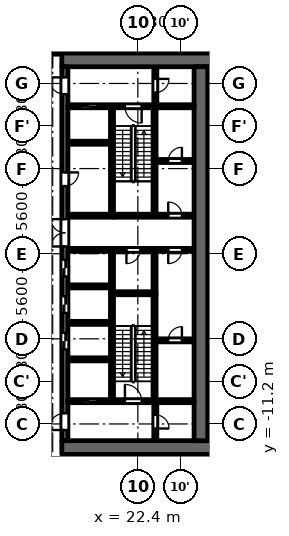
"""IFC4 building model, lengths in metres.
Left out: names, types, materials, properties, quantities, classifications, styles, units other than length and angle.
Written with IfcOpenShell. Run it as: python <this file> out.ifc"""

import sys

from ifc_helpers import new_model, si_unit, direction, frame, frame_2d, origin, place, context, subcontext, project, spatial, rectangle, extrude, element, fill, save


model = new_model("IFC4")
c1 = context("Model", 3, precision=1e-05, world=origin(), true_north=direction((0.0, 1.0)))
c2 = subcontext(c1, "Body", "Model", "MODEL_VIEW")
j1 = project(units=[si_unit("LENGTHUNIT", "METRE"), si_unit("PLANEANGLEUNIT", "RADIAN")], contexts=[c1])
p1 = place(None, origin())
s1 = spatial("IfcSite", under=j1, at=p1, CompositionType="ELEMENT")
p2 = place(p1, origin())
s2 = spatial("IfcBuilding", under=s1, at=p2, CompositionType="ELEMENT")
p3 = place(p2, frame((0.0, 0.0, 6.5)))
s3 = spatial("IfcBuildingStorey", under=s2, at=p3, CompositionType="ELEMENT", Elevation=6.5)
p4 = place(p3, frame((23.5, -2.5, 0.0), z_axis=(0.0, 0.0, 1.0), x_axis=(0.0, 1.0, 0.0)))
e1 = element("IfcWall", 1, at=p4, inside=s3, PredefinedType="PARTITIONING", context=c2, shape_type="SweptSolid", body=[
    extrude(rectangle(XDim=2.65, YDim=0.2, at=frame_2d((1.325, 0.0))), origin(), (0.0, 0.0, 1.0), 4.45),
])
p5 = place(p3, frame((20.7, 2.6, 0.0), z_axis=(0.0, 0.0, 1.0), x_axis=(0.0, 1.0, 0.0)))
e2 = element("IfcWall", 2, at=p5, inside=s3, PredefinedType="SHEAR", context=c2, shape_type="SweptSolid", body=[
    extrude(rectangle(XDim=7.0, YDim=0.2, at=frame_2d((3.5, 0.0))), origin(), (0.0, 0.0, 1.0), 4.45),
])
p6 = place(p3, frame((20.7, -9.6, 0.0), z_axis=(0.0, 0.0, 1.0), x_axis=(0.0, 1.0, 0.0)))
e3 = element("IfcWall", 3, at=p6, inside=s3, PredefinedType="SHEAR", context=c2, shape_type="SweptSolid", body=[
    extrude(rectangle(XDim=9.75, YDim=0.2, at=frame_2d((4.875, 0.0))), origin(), (0.0, 0.0, 1.0), 4.45),
])
p7 = place(p3, frame((20.8, 2.5, 0.0), z_axis=(0.0, 0.0, 1.0), x_axis=(1.0, 0.0, 0.0)))
e4 = element("IfcWall", 4, at=p7, inside=s3, PredefinedType="SHEAR", context=c2, shape_type="SweptSolid", body=[
    extrude(rectangle(XDim=5.3, YDim=0.2, at=frame_2d((2.65, 0.0))), origin(), (0.0, 0.0, 1.0), 4.45),
])
p8 = place(p7, frame((3.6, 0.0, 0.0)))
e5 = element("IfcOpeningElement", 5, at=p8, cuts=e4, PredefinedType="OPENING", context=c2, shape_type="SweptSolid", body=[
    extrude(rectangle(XDim=0.9, YDim=2.1, at=frame_2d((0.45, 1.05))), frame((0.0, 0.11, 0.0), z_axis=(0.0, -1.0, 0.0), x_axis=(1.0, 0.0, 0.0)), (0.0, 0.0, 1.0), 0.22),
])
p9 = place(p3, frame((20.8, 0.25, 0.0), z_axis=(0.0, 0.0, 1.0), x_axis=(1.0, 0.0, 0.0)))
e6 = element("IfcWall", 6, at=p9, inside=s3, PredefinedType="PARTITIONING", context=c2, shape_type="SweptSolid", body=[
    extrude(rectangle(XDim=5.3, YDim=0.2, at=frame_2d((2.65, 0.0))), origin(), (0.0, 0.0, 1.0), 4.45),
])
p10 = place(p9, frame((0.85, 0.0, 0.0)))
e7 = element("IfcOpeningElement", 7, at=p10, cuts=e6, PredefinedType="OPENING", context=c2, shape_type="SweptSolid", body=[
    extrude(rectangle(XDim=0.9, YDim=2.1, at=frame_2d((0.45, 1.05))), frame((0.0, 0.11, 0.0), z_axis=(0.0, -1.0, 0.0), x_axis=(1.0, 0.0, 0.0)), (0.0, 0.0, 1.0), 0.22),
])
p11 = place(p9, frame((3.6, 0.0, 0.0)))
e8 = element("IfcOpeningElement", 8, at=p11, cuts=e6, PredefinedType="OPENING", context=c2, shape_type="SweptSolid", body=[
    extrude(rectangle(XDim=0.9, YDim=2.1, at=frame_2d((0.45, 1.05))), frame((0.0, 0.11, 0.0), z_axis=(0.0, -1.0, 0.0), x_axis=(1.0, 0.0, 0.0)), (0.0, 0.0, 1.0), 0.22),
])
for number, where, z_axis, x_axis in (
    (9, (17.4, 12.75, 0.0), (0.0, 0.0, 1.0), (1.0, 0.0, 0.0)),
    (10, (17.4, -12.75, 0.0), (0.0, 0.0, 1.0), (1.0, 0.0, 0.0)),
):
    element("IfcWall", number, at=place(p3, frame(where, z_axis=z_axis, x_axis=x_axis)), inside=s3, PredefinedType="SHEAR", context=c2, shape_type="SweptSolid", body=[
        extrude(rectangle(XDim=10.4, YDim=0.9, at=frame_2d((5.2, 0.0))), origin(), (0.0, 0.0, 1.0), 4.45),
    ])
p12 = place(p3, frame((17.6, -12.3, 0.0), z_axis=(0.0, 0.0, 1.0), x_axis=(0.0, 1.0, 0.0)))
e11 = element("IfcWall", 11, at=p12, inside=s3, PredefinedType="SHEAR", context=c2, shape_type="SweptSolid", body=[
    extrude(rectangle(XDim=24.6, YDim=0.4, at=frame_2d((12.3, 0.0))), origin(), (0.0, 0.0, 1.0), 4.45),
])
p13 = place(p12, frame((6.0, 0.0, 0.0)))
e12 = element("IfcOpeningElement", 12, at=p13, cuts=e11, PredefinedType="OPENING", context=c2, shape_type="SweptSolid", body=[
    extrude(rectangle(XDim=1.1, YDim=2.1, at=frame_2d((0.55, 1.05))), frame((0.0, 0.21, 0.0), z_axis=(0.0, -1.0, 0.0), x_axis=(1.0, 0.0, 0.0)), (0.0, 0.0, 1.0), 0.42),
])
p14 = place(p12, frame((8.4, 0.0, 0.0)))
e13 = element("IfcOpeningElement", 13, at=p14, cuts=e11, PredefinedType="OPENING", context=c2, shape_type="SweptSolid", body=[
    extrude(rectangle(XDim=1.1, YDim=2.1, at=frame_2d((0.55, 1.05))), frame((0.0, 0.21, 0.0), z_axis=(0.0, -1.0, 0.0), x_axis=(1.0, 0.0, 0.0)), (0.0, 0.0, 1.0), 0.42),
])
p15 = place(p12, frame((10.8, 0.0, 0.0)))
e14 = element("IfcOpeningElement", 14, at=p15, cuts=e11, PredefinedType="OPENING", context=c2, shape_type="SweptSolid", body=[
    extrude(rectangle(XDim=1.1, YDim=2.1, at=frame_2d((0.55, 1.05))), frame((0.0, 0.21, 0.0), z_axis=(0.0, -1.0, 0.0), x_axis=(1.0, 0.0, 0.0)), (0.0, 0.0, 1.0), 0.42),
])
p16 = place(p12, frame((16.75, 0.0, 0.0)))
e15 = element("IfcOpeningElement", 15, at=p16, cuts=e11, PredefinedType="OPENING", context=c2, shape_type="SweptSolid", body=[
    extrude(rectangle(XDim=0.9, YDim=2.1, at=frame_2d((0.45, 1.05))), frame((0.0, 0.21, 0.0), z_axis=(0.0, -1.0, 0.0), x_axis=(1.0, 0.0, 0.0)), (0.0, 0.0, 1.0), 0.42),
])
p17 = place(p12, frame((22.8, 0.0, 0.0)))
e16 = element("IfcOpeningElement", 16, at=p17, cuts=e11, PredefinedType="OPENING", context=c2, shape_type="SweptSolid", body=[
    extrude(rectangle(XDim=1.1, YDim=2.1, at=frame_2d((0.55, 1.05))), frame((0.0, 0.21, 0.0), z_axis=(0.0, -1.0, 0.0), x_axis=(1.0, 0.0, 0.0)), (0.0, 0.0, 1.0), 0.42),
])
p18 = place(p12, frame((0.7, 0.0, 0.0)))
e17 = element("IfcOpeningElement", 17, at=p18, cuts=e11, PredefinedType="OPENING", context=c2, shape_type="SweptSolid", body=[
    extrude(rectangle(XDim=1.1, YDim=2.1, at=frame_2d((0.55, 1.05))), frame((0.0, 0.21, 0.0), z_axis=(0.0, -1.0, 0.0), x_axis=(1.0, 0.0, 0.0)), (0.0, 0.0, 1.0), 0.42),
])
p19 = place(p12, frame((12.775, 0.0, 0.0)))
e18 = element("IfcOpeningElement", 18, at=p19, cuts=e11, PredefinedType="OPENING", context=c2, shape_type="SweptSolid", body=[
    extrude(rectangle(XDim=1.8, YDim=2.1, at=frame_2d((0.9, 1.05))), frame((0.0, 0.21, 0.0), z_axis=(0.0, -1.0, 0.0), x_axis=(1.0, 0.0, 0.0)), (0.0, 0.0, 1.0), 0.42),
])
p20 = place(p3, frame((26.55, -12.3, 0.0), z_axis=(0.0, 0.0, 1.0), x_axis=(0.0, 1.0, 0.0)))
e19 = element("IfcWall", 19, at=p20, inside=s3, PredefinedType="SHEAR", context=c2, shape_type="SweptSolid", body=[
    extrude(rectangle(XDim=24.6, YDim=0.9, at=frame_2d((12.3, 0.0))), origin(), (0.0, 0.0, 1.0), 4.45),
])
p21 = place(p3, frame((23.55, 9.8, 0.0), z_axis=(0.0, 0.0, 1.0), x_axis=(0.0, 1.0, 0.0)))
e20 = element("IfcWall", 20, at=p21, inside=s3, PredefinedType="PARTITIONING", context=c2, shape_type="SweptSolid", body=[
    extrude(rectangle(XDim=2.5, YDim=0.2, at=frame_2d((1.25, 0.0))), origin(), (0.0, 0.0, 1.0), 4.45),
])
p22 = place(p21, frame((0.8, 0.0, 0.0)))
e21 = element("IfcOpeningElement", 21, at=p22, cuts=e20, PredefinedType="OPENING", context=c2, shape_type="SweptSolid", body=[
    extrude(rectangle(XDim=0.9, YDim=2.1, at=frame_2d((0.45, 1.05))), frame((0.0, 0.11, 0.0), z_axis=(0.0, -1.0, 0.0), x_axis=(1.0, 0.0, 0.0)), (0.0, 0.0, 1.0), 0.22),
])
p23 = place(p3, frame((23.55, -12.3, 0.0), z_axis=(0.0, 0.0, 1.0), x_axis=(0.0, 1.0, 0.0)))
e22 = element("IfcWall", 22, at=p23, inside=s3, PredefinedType="PARTITIONING", context=c2, shape_type="SweptSolid", body=[
    extrude(rectangle(XDim=2.5, YDim=0.2, at=frame_2d((1.25, 0.0))), origin(), (0.0, 0.0, 1.0), 4.45),
])
p24 = place(p23, frame((0.8, 0.0, 0.0)))
e23 = element("IfcOpeningElement", 23, at=p24, cuts=e22, PredefinedType="OPENING", context=c2, shape_type="SweptSolid", body=[
    extrude(rectangle(XDim=0.9, YDim=2.1, at=frame_2d((0.45, 1.05))), frame((0.0, 0.11, 0.0), z_axis=(0.0, -1.0, 0.0), x_axis=(1.0, 0.0, 0.0)), (0.0, 0.0, 1.0), 0.22),
])
p25 = place(p3, frame((23.6, -5.7, 0.0), z_axis=(0.0, 0.0, 1.0), x_axis=(1.0, 0.0, 0.0)))
e24 = element("IfcWall", 24, at=p25, inside=s3, PredefinedType="PARTITIONING", context=c2, shape_type="SweptSolid", body=[
    extrude(rectangle(XDim=2.5, YDim=0.2, at=frame_2d((1.25, 0.0))), origin(), (0.0, 0.0, 1.0), 4.45),
])
p26 = place(p25, frame((0.8, 0.0, 0.0)))
e25 = element("IfcOpeningElement", 25, at=p26, cuts=e24, PredefinedType="OPENING", context=c2, shape_type="SweptSolid", body=[
    extrude(rectangle(XDim=0.9, YDim=2.1, at=frame_2d((0.45, 1.05))), frame((0.0, 0.11, 0.0), z_axis=(0.0, -1.0, 0.0), x_axis=(1.0, 0.0, 0.0)), (0.0, 0.0, 1.0), 0.22),
])
p27 = place(p3, frame((23.6, 6.1, 0.0), z_axis=(0.0, 0.0, 1.0), x_axis=(1.0, 0.0, 0.0)))
e26 = element("IfcWall", 26, at=p27, inside=s3, PredefinedType="PARTITIONING", context=c2, shape_type="SweptSolid", body=[
    extrude(rectangle(XDim=2.5, YDim=0.2, at=frame_2d((1.25, 0.0))), origin(), (0.0, 0.0, 1.0), 4.45),
])
p28 = place(p27, frame((0.8, 0.0, 0.0)))
e27 = element("IfcOpeningElement", 27, at=p28, cuts=e26, PredefinedType="OPENING", context=c2, shape_type="SweptSolid", body=[
    extrude(rectangle(XDim=0.9, YDim=2.1, at=frame_2d((0.45, 1.05))), frame((0.0, 0.11, 0.0), z_axis=(0.0, -1.0, 0.0), x_axis=(1.0, 0.0, 0.0)), (0.0, 0.0, 1.0), 0.22),
])
p29 = place(p3, frame((17.8, -9.7, 0.0), z_axis=(0.0, 0.0, 1.0), x_axis=(1.0, 0.0, 0.0)))
e28 = element("IfcWall", 28, at=p29, inside=s3, PredefinedType="SHEAR", context=c2, shape_type="SweptSolid", body=[
    extrude(rectangle(XDim=8.3, YDim=0.2, at=frame_2d((4.15, 0.0))), origin(), (0.0, 0.0, 1.0), 4.45),
])
p30 = place(p29, frame((0.85, 0.0, 0.0)))
e29 = element("IfcOpeningElement", 29, at=p30, cuts=e28, PredefinedType="OPENING", context=c2, shape_type="SweptSolid", body=[
    extrude(rectangle(XDim=1.1, YDim=2.1, at=frame_2d((0.55, 1.05))), frame((0.0, 0.11, 0.0), z_axis=(0.0, -1.0, 0.0), x_axis=(1.0, 0.0, 0.0)), (0.0, 0.0, 1.0), 0.22),
])
p31 = place(p29, frame((3.75, 0.0, 0.0)))
e30 = element("IfcOpeningElement", 30, at=p31, cuts=e28, PredefinedType="OPENING", context=c2, shape_type="SweptSolid", body=[
    extrude(rectangle(XDim=1.1, YDim=2.1, at=frame_2d((0.55, 1.05))), frame((0.0, 0.11, 0.0), z_axis=(0.0, -1.0, 0.0), x_axis=(1.0, 0.0, 0.0)), (0.0, 0.0, 1.0), 0.22),
])
for number, where, z_axis, x_axis in (
    (31, (17.8, -6.95, 0.0), (0.0, 0.0, 1.0), (1.0, 0.0, 0.0)),
    (32, (17.8, -4.55, 0.0), (0.0, 0.0, 1.0), (1.0, 0.0, 0.0)),
    (33, (17.8, -2.15, 0.0), (0.0, 0.0, 1.0), (1.0, 0.0, 0.0)),
):
    element("IfcWall", number, at=place(p3, frame(where, z_axis=z_axis, x_axis=x_axis)), inside=s3, PredefinedType="PARTITIONING", context=c2, shape_type="SweptSolid", body=[
        extrude(rectangle(XDim=2.8, YDim=0.2, at=frame_2d((1.4, 0.0))), origin(), (0.0, 0.0, 1.0), 4.45),
    ])
for number, where, z_axis, x_axis in (
    (34, (17.8, 0.25, 0.0), (0.0, 0.0, 1.0), (1.0, 0.0, 0.0)),
    (35, (17.8, 2.5, 0.0), (0.0, 0.0, 1.0), (1.0, 0.0, 0.0)),
):
    element("IfcWall", number, at=place(p3, frame(where, z_axis=z_axis, x_axis=x_axis)), inside=s3, PredefinedType="PARTITIONING", context=c2, shape_type="SweptSolid", body=[
        extrude(rectangle(XDim=3.0, YDim=0.2, at=frame_2d((1.5, 0.0))), origin(), (0.0, 0.0, 1.0), 4.45),
    ])
p32 = place(p3, frame((17.8, 7.3, 0.0), z_axis=(0.0, 0.0, 1.0), x_axis=(1.0, 0.0, 0.0)))
e36 = element("IfcWall", 36, at=p32, inside=s3, PredefinedType="PARTITIONING", context=c2, shape_type="SweptSolid", body=[
    extrude(rectangle(XDim=2.8, YDim=0.2, at=frame_2d((1.4, 0.0))), origin(), (0.0, 0.0, 1.0), 4.45),
])
p33 = place(p3, frame((17.8, 9.7, 0.0), z_axis=(0.0, 0.0, 1.0), x_axis=(1.0, 0.0, 0.0)))
e37 = element("IfcWall", 37, at=p33, inside=s3, PredefinedType="SHEAR", context=c2, shape_type="SweptSolid", body=[
    extrude(rectangle(XDim=8.3, YDim=0.2, at=frame_2d((4.15, 0.0))), origin(), (0.0, 0.0, 1.0), 4.45),
])
p34 = place(p33, frame((0.85, 0.0, 0.0)))
e38 = element("IfcOpeningElement", 38, at=p34, cuts=e37, PredefinedType="OPENING", context=c2, shape_type="SweptSolid", body=[
    extrude(rectangle(XDim=1.1, YDim=2.1, at=frame_2d((0.55, 1.05))), frame((0.0, 0.11, 0.0), z_axis=(0.0, -1.0, 0.0), x_axis=(1.0, 0.0, 0.0)), (0.0, 0.0, 1.0), 0.22),
])
p35 = place(p33, frame((3.75, 0.0, 0.0)))
e39 = element("IfcOpeningElement", 39, at=p35, cuts=e37, PredefinedType="OPENING", context=c2, shape_type="SweptSolid", body=[
    extrude(rectangle(XDim=1.1, YDim=2.1, at=frame_2d((0.55, 1.05))), frame((0.0, 0.11, 0.0), z_axis=(0.0, -1.0, 0.0), x_axis=(1.0, 0.0, 0.0)), (0.0, 0.0, 1.0), 0.22),
])
p36 = place(p3, frame((23.5, 2.6, 0.0), z_axis=(0.0, 0.0, 1.0), x_axis=(0.0, 1.0, 0.0)))
e40 = element("IfcWall", 40, at=p36, inside=s3, PredefinedType="SHEAR", context=c2, shape_type="SweptSolid", body=[
    extrude(rectangle(XDim=7.0, YDim=0.2, at=frame_2d((3.5, 0.0))), origin(), (0.0, 0.0, 1.0), 4.45),
])
p37 = place(p3, frame((23.5, -9.6, 0.0), z_axis=(0.0, 0.0, 1.0), x_axis=(0.0, 1.0, 0.0)))
e41 = element("IfcWall", 41, at=p37, inside=s3, PredefinedType="SHEAR", context=c2, shape_type="SweptSolid", body=[
    extrude(rectangle(XDim=6.9, YDim=0.2, at=frame_2d((3.45, 0.0))), origin(), (0.0, 0.0, 1.0), 4.45),
])
p38 = place(p3, frame((20.8, -2.6, 0.0), z_axis=(0.0, 0.0, 1.0), x_axis=(1.0, 0.0, 0.0)))
e42 = element("IfcWall", 42, at=p38, inside=s3, PredefinedType="SHEAR", context=c2, shape_type="SweptSolid", body=[
    extrude(rectangle(XDim=2.8, YDim=0.2, at=frame_2d((1.4, 0.0))), origin(), (0.0, 0.0, 1.0), 4.45),
])
p39 = place(p3, frame((-17.4, 13.2, 0.0), z_axis=(0.0, 0.0, 1.0), x_axis=(1.0, 0.0, 0.0)))
e43 = element("IfcWall", 43, at=p39, inside=s3, PredefinedType="PARTITIONING", context=c2, shape_type="SweptSolid", body=[
    extrude(rectangle(XDim=34.8, YDim=0.15, at=frame_2d((17.4, 0.0))), origin(), (0.0, 0.0, 1.0), 4.45),
])
p40 = place(p39, frame((3.05, 0.0, 0.0)))
e44 = element("IfcOpeningElement", 44, at=p40, cuts=e43, PredefinedType="OPENING", context=c2, shape_type="SweptSolid", body=[
    extrude(rectangle(XDim=1.8, YDim=2.1, at=frame_2d((0.9, 1.05))), frame((0.0, 0.085, 0.0), z_axis=(0.0, -1.0, 0.0), x_axis=(1.0, 0.0, 0.0)), (0.0, 0.0, 1.0), 0.17),
])
p41 = place(p39, frame((0.75, 0.0, 0.0)))
e45 = element("IfcOpeningElement", 45, at=p41, cuts=e43, PredefinedType="OPENING", context=c2, shape_type="SweptSolid", body=[
    extrude(rectangle(XDim=1.0, YDim=2.1, at=frame_2d((0.5, 1.05))), frame((0.0, 0.085, 0.0), z_axis=(0.0, -1.0, 0.0), x_axis=(1.0, 0.0, 0.0)), (0.0, 0.0, 1.0), 0.17),
])
p42 = place(p39, frame((33.15, 0.0, 0.0)))
e46 = element("IfcOpeningElement", 46, at=p42, cuts=e43, PredefinedType="OPENING", context=c2, shape_type="SweptSolid", body=[
    extrude(rectangle(XDim=1.0, YDim=2.1, at=frame_2d((0.5, 1.05))), frame((0.0, 0.085, 0.0), z_axis=(0.0, -1.0, 0.0), x_axis=(1.0, 0.0, 0.0)), (0.0, 0.0, 1.0), 0.17),
])
p43 = place(p30, origin())
e47 = element("IfcDoor", 47, at=p43, inside=s3, OperationType="DOUBLE_DOOR_SLIDING", PredefinedType="DOOR", context=c2, shape_type="SweptSolid", body=[
    extrude(rectangle(XDim=1.1, YDim=2.1, at=frame_2d((0.55, 1.05))), frame((0.0, 0.025, 0.0), z_axis=(0.0, -1.0, 0.0), x_axis=(1.0, 0.0, 0.0)), (0.0, 0.0, 1.0), 0.05),
])
fill(e29, e47)
p44 = place(p13, origin())
e48 = element("IfcDoor", 48, at=p44, inside=s3, OperationType="DOUBLE_DOOR_SLIDING", PredefinedType="DOOR", context=c2, shape_type="SweptSolid", body=[
    extrude(rectangle(XDim=1.1, YDim=2.1, at=frame_2d((0.55, 1.05))), frame((0.0, 0.025, 0.0), z_axis=(0.0, -1.0, 0.0), x_axis=(1.0, 0.0, 0.0)), (0.0, 0.0, 1.0), 0.05),
])
fill(e12, e48)
p45 = place(p14, origin())
e49 = element("IfcDoor", 49, at=p45, inside=s3, OperationType="DOUBLE_DOOR_SLIDING", PredefinedType="DOOR", context=c2, shape_type="SweptSolid", body=[
    extrude(rectangle(XDim=1.1, YDim=2.1, at=frame_2d((0.55, 1.05))), frame((0.0, 0.025, 0.0), z_axis=(0.0, -1.0, 0.0), x_axis=(1.0, 0.0, 0.0)), (0.0, 0.0, 1.0), 0.05),
])
fill(e13, e49)
p46 = place(p15, origin())
e50 = element("IfcDoor", 50, at=p46, inside=s3, OperationType="DOUBLE_DOOR_SLIDING", PredefinedType="DOOR", context=c2, shape_type="SweptSolid", body=[
    extrude(rectangle(XDim=1.1, YDim=2.1, at=frame_2d((0.55, 1.05))), frame((0.0, 0.025, 0.0), z_axis=(0.0, -1.0, 0.0), x_axis=(1.0, 0.0, 0.0)), (0.0, 0.0, 1.0), 0.05),
])
fill(e14, e50)
p47 = place(p16, origin())
e51 = element("IfcDoor", 51, at=p47, inside=s3, OperationType="SINGLE_SWING_RIGHT", PredefinedType="DOOR", context=c2, shape_type="SweptSolid", body=[
    extrude(rectangle(XDim=0.9, YDim=2.1, at=frame_2d((0.45, 1.05))), frame((0.0, 0.025, 0.0), z_axis=(0.0, -1.0, 0.0), x_axis=(1.0, 0.0, 0.0)), (0.0, 0.0, 1.0), 0.05),
])
fill(e15, e51)
p48 = place(p34, origin())
e52 = element("IfcDoor", 52, at=p48, inside=s3, OperationType="DOUBLE_DOOR_SLIDING", PredefinedType="DOOR", context=c2, shape_type="SweptSolid", body=[
    extrude(rectangle(XDim=1.1, YDim=2.1, at=frame_2d((0.55, 1.05))), frame((0.0, 0.025, 0.0), z_axis=(0.0, -1.0, 0.0), x_axis=(1.0, 0.0, 0.0)), (0.0, 0.0, 1.0), 0.05),
])
fill(e38, e52)
p49 = place(p17, origin())
e53 = element("IfcDoor", 53, at=p49, inside=s3, OperationType="SINGLE_SWING_LEFT", PredefinedType="DOOR", context=c2, shape_type="SweptSolid", body=[
    extrude(rectangle(XDim=1.1, YDim=2.1, at=frame_2d((0.55, 1.05))), frame((0.0, 0.025, 0.0), z_axis=(0.0, -1.0, 0.0), x_axis=(1.0, 0.0, 0.0)), (0.0, 0.0, 1.0), 0.05),
])
fill(e16, e53)
p50 = place(p18, origin())
e54 = element("IfcDoor", 54, at=p50, inside=s3, OperationType="SINGLE_SWING_RIGHT", PredefinedType="DOOR", context=c2, shape_type="SweptSolid", body=[
    extrude(rectangle(XDim=1.1, YDim=2.1, at=frame_2d((0.55, 1.05))), frame((0.0, 0.025, 0.0), z_axis=(0.0, -1.0, 0.0), x_axis=(1.0, 0.0, 0.0)), (0.0, 0.0, 1.0), 0.05),
])
fill(e17, e54)
p51 = place(p22, origin())
e55 = element("IfcDoor", 55, at=p51, inside=s3, OperationType="SINGLE_SWING_RIGHT", PredefinedType="DOOR", context=c2, shape_type="SweptSolid", body=[
    extrude(rectangle(XDim=0.9, YDim=2.1, at=frame_2d((0.45, 1.05))), frame((0.0, 0.025, 0.0), z_axis=(0.0, -1.0, 0.0), x_axis=(1.0, 0.0, 0.0)), (0.0, 0.0, 1.0), 0.05),
])
fill(e21, e55)
p52 = place(p24, origin())
e56 = element("IfcDoor", 56, at=p52, inside=s3, OperationType="SINGLE_SWING_LEFT", PredefinedType="DOOR", context=c2, shape_type="SweptSolid", body=[
    extrude(rectangle(XDim=0.9, YDim=2.1, at=frame_2d((0.45, 1.05))), frame((0.0, 0.025, 0.0), z_axis=(0.0, -1.0, 0.0), x_axis=(1.0, 0.0, 0.0)), (0.0, 0.0, 1.0), 0.05),
])
fill(e23, e56)
p53 = place(p35, origin())
e57 = element("IfcDoor", 57, at=p53, inside=s3, OperationType="SINGLE_SWING_RIGHT", PredefinedType="DOOR", context=c2, shape_type="SweptSolid", body=[
    extrude(rectangle(XDim=1.1, YDim=2.1, at=frame_2d((0.55, 1.05))), frame((0.0, 0.025, 0.0), z_axis=(0.0, -1.0, 0.0), x_axis=(1.0, 0.0, 0.0)), (0.0, 0.0, 1.0), 0.05),
])
fill(e39, e57)
p54 = place(p31, origin())
e58 = element("IfcDoor", 58, at=p54, inside=s3, OperationType="SINGLE_SWING_RIGHT", PredefinedType="DOOR", context=c2, shape_type="SweptSolid", body=[
    extrude(rectangle(XDim=1.1, YDim=2.1, at=frame_2d((0.55, 1.05))), frame((0.0, 0.025, 0.0), z_axis=(0.0, -1.0, 0.0), x_axis=(1.0, 0.0, 0.0)), (0.0, 0.0, 1.0), 0.05),
])
fill(e30, e58)
p55 = place(p19, origin())
e59 = element("IfcDoor", 59, at=p55, inside=s3, OperationType="DOUBLE_DOOR_SINGLE_SWING", PredefinedType="DOOR", context=c2, shape_type="SweptSolid", body=[
    extrude(rectangle(XDim=1.8, YDim=2.1, at=frame_2d((0.9, 1.05))), frame((0.0, 0.025, 0.0), z_axis=(0.0, -1.0, 0.0), x_axis=(1.0, 0.0, 0.0)), (0.0, 0.0, 1.0), 0.05),
])
fill(e18, e59)
p56 = place(p10, origin())
e60 = element("IfcDoor", 60, at=p56, inside=s3, OperationType="SINGLE_SWING_LEFT", PredefinedType="DOOR", context=c2, shape_type="SweptSolid", body=[
    extrude(rectangle(XDim=0.9, YDim=2.1, at=frame_2d((0.45, 1.05))), frame((0.0, 0.025, 0.0), z_axis=(0.0, -1.0, 0.0), x_axis=(1.0, 0.0, 0.0)), (0.0, 0.0, 1.0), 0.05),
])
fill(e7, e60)
p57 = place(p26, origin())
e61 = element("IfcDoor", 61, at=p57, inside=s3, OperationType="SINGLE_SWING_LEFT", PredefinedType="DOOR", context=c2, shape_type="SweptSolid", body=[
    extrude(rectangle(XDim=0.9, YDim=2.1, at=frame_2d((0.45, 1.05))), frame((0.0, 0.025, 0.0), z_axis=(0.0, -1.0, 0.0), x_axis=(1.0, 0.0, 0.0)), (0.0, 0.0, 1.0), 0.05),
])
fill(e25, e61)
p58 = place(p11, origin())
e62 = element("IfcDoor", 62, at=p58, inside=s3, OperationType="SINGLE_SWING_LEFT", PredefinedType="DOOR", context=c2, shape_type="SweptSolid", body=[
    extrude(rectangle(XDim=0.9, YDim=2.1, at=frame_2d((0.45, 1.05))), frame((0.0, 0.025, 0.0), z_axis=(0.0, -1.0, 0.0), x_axis=(1.0, 0.0, 0.0)), (0.0, 0.0, 1.0), 0.05),
])
fill(e8, e62)
p59 = place(p28, origin())
e63 = element("IfcDoor", 63, at=p59, inside=s3, OperationType="SINGLE_SWING_LEFT", PredefinedType="DOOR", context=c2, shape_type="SweptSolid", body=[
    extrude(rectangle(XDim=0.9, YDim=2.1, at=frame_2d((0.45, 1.05))), frame((0.0, 0.025, 0.0), z_axis=(0.0, -1.0, 0.0), x_axis=(1.0, 0.0, 0.0)), (0.0, 0.0, 1.0), 0.05),
])
fill(e27, e63)
p60 = place(p8, origin())
e64 = element("IfcDoor", 64, at=p60, inside=s3, OperationType="SINGLE_SWING_RIGHT", PredefinedType="DOOR", context=c2, shape_type="SweptSolid", body=[
    extrude(rectangle(XDim=0.9, YDim=2.1, at=frame_2d((0.45, 1.05))), frame((0.0, 0.025, 0.0), z_axis=(0.0, -1.0, 0.0), x_axis=(1.0, 0.0, 0.0)), (0.0, 0.0, 1.0), 0.05),
])
fill(e5, e64)
save(model, sys.argv[1])
